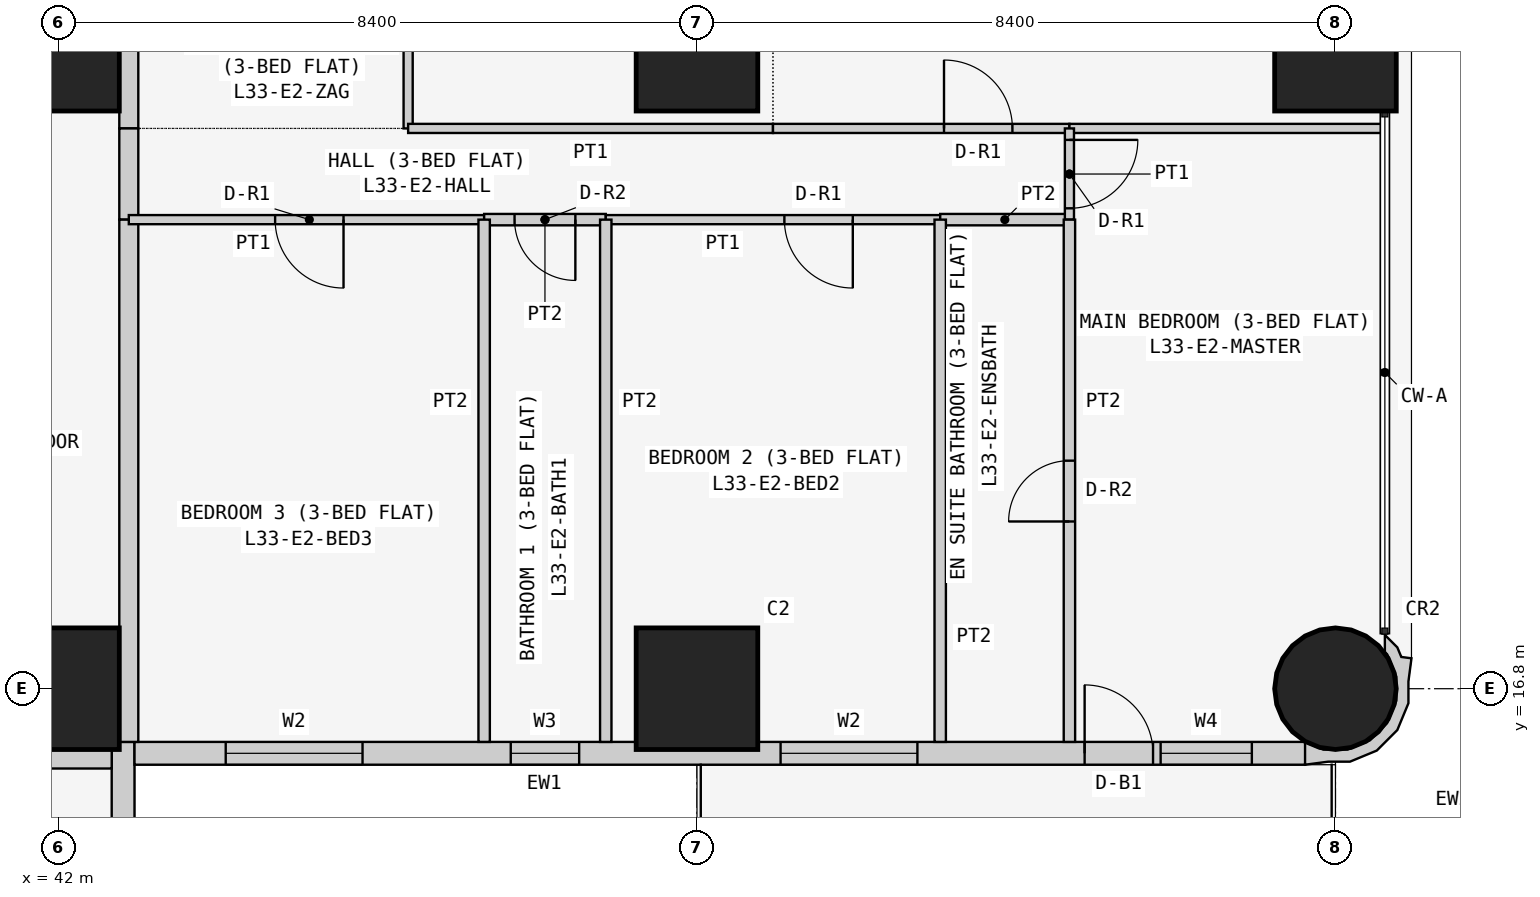
"""IFC4 building model, lengths in metres.
Left out: names, types, materials, properties, quantities, classifications, styles, units other than length and angle.
Written with IfcOpenShell. Run it as: python <this file> out.ifc"""

import sys

from ifc_helpers import new_model, si_unit, direction, frame, frame_2d, origin, origin_2d, place, context, subcontext, project, spatial, polyline, rectangle, circle, outline, extrude, element, fill, save


model = new_model("IFC4")
c1 = context("Model", 3, precision=1e-05, world=origin(), true_north=direction((0.0, 1.0)))
c2 = subcontext(c1, "Body", "Model", "MODEL_VIEW")
j1 = project(units=[si_unit("LENGTHUNIT", "METRE"), si_unit("PLANEANGLEUNIT", "RADIAN")], contexts=[c1])
p1 = place(None, origin())
s1 = spatial("IfcSite", under=j1, at=p1, CompositionType="ELEMENT")
p2 = place(p1, origin())
s2 = spatial("IfcBuilding", under=s1, at=p2, CompositionType="ELEMENT")
p3 = place(p2, frame((0.0, 0.0, 130.5)))
s3 = spatial("IfcBuildingStorey", under=s2, at=p3, CompositionType="ELEMENT", Elevation=130.5)
for number, where, z_axis, x_axis in (
    (1, (42.0, 16.8, 0.0), (0.0, 0.0, 1.0), (1.0, 0.0, 0.0)),
    (2, (42.0, 25.2, 0.0), (0.0, 0.0, 1.0), (1.0, 0.0, 0.0)),
    (3, (50.4, 16.8, 0.0), (0.0, 0.0, 1.0), (1.0, 0.0, 0.0)),
    (4, (50.4, 25.2, 0.0), (0.0, 0.0, 1.0), (1.0, 0.0, 0.0)),
):
    element("IfcColumn", number, at=place(p3, frame(where, z_axis=z_axis, x_axis=x_axis)), inside=s3, PredefinedType="COLUMN", context=c2, shape_type="SweptSolid", body=[
        extrude(rectangle(XDim=1.6, YDim=1.6, at=origin_2d()), origin(), (0.0, 0.0, 1.0), 3.6),
    ])
p4 = place(p3, frame((58.8, 16.8, 0.0), z_axis=(0.0, 0.0, 1.0), x_axis=(1.0, 0.0, 0.0)))
e5 = element("IfcColumn", 5, at=p4, inside=s3, PredefinedType="COLUMN", context=c2, shape_type="SweptSolid", body=[
    extrude(circle(Radius=0.8, at=origin_2d()), origin(), (0.0, 0.0, 1.0), 3.6),
])
p5 = place(p3, frame((58.8, 25.2, 0.0), z_axis=(0.0, 0.0, 1.0), x_axis=(1.0, 0.0, 0.0)))
e6 = element("IfcColumn", 6, at=p5, inside=s3, PredefinedType="COLUMN", context=c2, shape_type="SweptSolid", body=[
    extrude(rectangle(XDim=1.6, YDim=1.6, at=origin_2d()), origin(), (0.0, 0.0, 1.0), 3.6),
])
p6 = place(p3, frame((42.85, 8.8, 0.0), z_axis=(0.0, 0.0, 1.0), x_axis=(0.0, 1.0, 0.0)))
e7 = element("IfcWall", 7, at=p6, inside=s3, PredefinedType="SOLIDWALL", context=c2, shape_type="SweptSolid", body=[
    extrude(rectangle(XDim=7.3, YDim=0.3, at=frame_2d((3.65, 0.0))), origin(), (0.0, 0.0, 1.0), 3.45),
])
p7 = place(p6, frame((3.1, 0.0, 0.9)))
e8 = element("IfcOpeningElement", 8, at=p7, cuts=e7, PredefinedType="OPENING", context=c2, shape_type="SweptSolid", body=[
    extrude(rectangle(XDim=2.4, YDim=1.5, at=frame_2d((1.2, 0.75))), frame((0.0, 0.16, 0.0), z_axis=(0.0, -1.0, 0.0), x_axis=(1.0, 0.0, 0.0)), (0.0, 0.0, 1.0), 0.32),
])
p8 = place(p6, frame((0.75, 0.0, 0.9)))
e9 = element("IfcOpeningElement", 9, at=p8, cuts=e7, PredefinedType="OPENING", context=c2, shape_type="SweptSolid", body=[
    extrude(rectangle(XDim=1.2, YDim=1.5, at=frame_2d((0.6, 0.75))), frame((0.0, 0.16, 0.0), z_axis=(0.0, -1.0, 0.0), x_axis=(1.0, 0.0, 0.0)), (0.0, 0.0, 1.0), 0.32),
])
p9 = place(p3, frame((43.0, 15.95, 0.0), z_axis=(0.0, 0.0, 1.0), x_axis=(1.0, 0.0, 0.0)))
e10 = element("IfcWall", 10, at=p9, inside=s3, PredefinedType="SOLIDWALL", context=c2, shape_type="SweptSolid", body=[
    extrude(rectangle(XDim=15.4, YDim=0.3, at=frame_2d((7.7, 0.0))), origin(), (0.0, 0.0, 1.0), 3.45),
])
p10 = place(p9, frame((1.2, 0.0, 0.9)))
e11 = element("IfcOpeningElement", 11, at=p10, cuts=e10, PredefinedType="OPENING", context=c2, shape_type="SweptSolid", body=[
    extrude(rectangle(XDim=1.8, YDim=1.5, at=frame_2d((0.9, 0.75))), frame((0.0, 0.16, 0.0), z_axis=(0.0, -1.0, 0.0), x_axis=(1.0, 0.0, 0.0)), (0.0, 0.0, 1.0), 0.32),
])
p11 = place(p9, frame((4.95, 0.0, 1.5)))
e12 = element("IfcOpeningElement", 12, at=p11, cuts=e10, PredefinedType="OPENING", context=c2, shape_type="SweptSolid", body=[
    extrude(rectangle(XDim=0.9, YDim=0.7, at=frame_2d((0.45, 0.35))), frame((0.0, 0.16, 0.0), z_axis=(0.0, -1.0, 0.0), x_axis=(1.0, 0.0, 0.0)), (0.0, 0.0, 1.0), 0.32),
])
p12 = place(p9, frame((8.5, 0.0, 0.9)))
e13 = element("IfcOpeningElement", 13, at=p12, cuts=e10, PredefinedType="OPENING", context=c2, shape_type="SweptSolid", body=[
    extrude(rectangle(XDim=1.8, YDim=1.5, at=frame_2d((0.9, 0.75))), frame((0.0, 0.16, 0.0), z_axis=(0.0, -1.0, 0.0), x_axis=(1.0, 0.0, 0.0)), (0.0, 0.0, 1.0), 0.32),
])
p13 = place(p9, frame((12.5, 0.0, 0.0)))
e14 = element("IfcOpeningElement", 14, at=p13, cuts=e10, PredefinedType="OPENING", context=c2, shape_type="SweptSolid", body=[
    extrude(rectangle(XDim=0.9, YDim=2.4, at=frame_2d((0.45, 1.2))), frame((0.0, 0.16, 0.0), z_axis=(0.0, -1.0, 0.0), x_axis=(1.0, 0.0, 0.0)), (0.0, 0.0, 1.0), 0.32),
])
p14 = place(p9, frame((13.5, 0.0, 0.9)))
e15 = element("IfcOpeningElement", 15, at=p14, cuts=e10, PredefinedType="OPENING", context=c2, shape_type="SweptSolid", body=[
    extrude(rectangle(XDim=1.2, YDim=1.5, at=frame_2d((0.6, 0.75))), frame((0.0, 0.16, 0.0), z_axis=(0.0, -1.0, 0.0), x_axis=(1.0, 0.0, 0.0)), (0.0, 0.0, 1.0), 0.32),
])
p15 = place(p3, frame((58.473, 15.983, 0.0), z_axis=(0.0, 0.0, 1.0), x_axis=(0.93923434088, -0.343276641956, 0.0)))
e16 = element("IfcWall", 16, at=p15, inside=s3, PredefinedType="SOLIDWALL", context=c2, shape_type="SweptSolid", body=[
    extrude(outline(polyline([(0.828, 1.599), (0.697, 1.569), (0.604, 1.67), (0.394, 1.767), (0.471, 1.556), (0.508, 1.539), (0.724, 1.304), (0.834, 1.005), (0.82, 0.686), (0.686, 0.397), (0.451, 0.182), (0.152, 0.073), (-0.116, 0.084), (-0.127, 0.078), (-0.146, 0.071), (-0.006, -0.197), (0.266, -0.055), (0.535, 0.044), (0.817, 0.302), (0.978, 0.648), (0.994, 1.03), (0.895, 1.3), (0.828, 1.599)])), origin(), (0.0, 0.0, 1.0), 3.45),
])
p16 = place(p3, frame((42.925, 29.4, 0.0), z_axis=(0.0, 0.0, 1.0), x_axis=(0.0, -1.0, 0.0)))
e17 = element("IfcWall", 17, at=p16, inside=s3, PredefinedType="PARTITIONING", context=c2, shape_type="SweptSolid", body=[
    extrude(rectangle(XDim=5.229, YDim=0.25, at=frame_2d((2.615, 0.0))), origin(), (0.0, 0.0, 1.0), 3.45),
])
p17 = place(p16, frame((2.1, 0.0, 0.0)))
e18 = element("IfcOpeningElement", 18, at=p17, cuts=e17, PredefinedType="OPENING", context=c2, shape_type="SweptSolid", body=[
    extrude(rectangle(XDim=1.0, YDim=2.1, at=frame_2d((0.5, 1.05))), frame((0.0, 0.135, 0.0), z_axis=(0.0, -1.0, 0.0), x_axis=(1.0, 0.0, 0.0)), (0.0, 0.0, 1.0), 0.27),
])
p18 = place(p3, frame((42.925, 24.171, 0.0), z_axis=(0.0, 0.0, 1.0), x_axis=(0.0, -1.0, 0.0)))
e19 = element("IfcWall", 19, at=p18, inside=s3, PredefinedType="PARTITIONING", context=c2, shape_type="SweptSolid", body=[
    extrude(rectangle(XDim=1.2, YDim=0.25, at=frame_2d((0.6, 0.0))), origin(), (0.0, 0.0, 1.0), 3.45),
])
for number, where, z_axis, x_axis in (
    (20, (42.925, 22.971, 0.0), (0.0, 0.0, 1.0), (0.0, -1.0, 0.0)),
    (21, (42.7, 15.875, 0.0), (0.0, 0.0, 1.0), (-1.0, 0.0, 0.0)),
):
    element("IfcWall", number, at=place(p3, frame(where, z_axis=z_axis, x_axis=x_axis)), inside=s3, PredefinedType="PARTITIONING", context=c2, shape_type="SweptSolid", body=[
        extrude(rectangle(XDim=6.871, YDim=0.25, at=frame_2d((3.436, 0.0))), origin(), (0.0, 0.0, 1.0), 3.45),
    ])
p19 = place(p3, frame((46.6, 29.4, 0.0), z_axis=(0.0, 0.0, 1.0), x_axis=(0.0, -1.0, 0.0)))
e22 = element("IfcWall", 22, at=p19, inside=s3, PredefinedType="PARTITIONING", context=c2, shape_type="SweptSolid", body=[
    extrude(rectangle(XDim=5.229, YDim=0.12, at=frame_2d((2.615, 0.0))), origin(), (0.0, 0.0, 1.0), 3.45),
])
p20 = place(p19, frame((1.05, 0.0, 0.0)))
e23 = element("IfcOpeningElement", 23, at=p20, cuts=e22, PredefinedType="OPENING", context=c2, shape_type="SweptSolid", body=[
    extrude(rectangle(XDim=0.9, YDim=2.1, at=frame_2d((0.45, 1.05))), frame((0.0, 0.07, 0.0), z_axis=(0.0, -1.0, 0.0), x_axis=(1.0, 0.0, 0.0)), (0.0, 0.0, 1.0), 0.14),
])
p21 = place(p3, frame((51.4, 24.171, 0.0), z_axis=(0.0, 0.0, 1.0), x_axis=(-1.0, 0.0, 0.0)))
e24 = element("IfcWall", 24, at=p21, inside=s3, PredefinedType="PARTITIONING", context=c2, shape_type="SweptSolid", body=[
    extrude(rectangle(XDim=4.8, YDim=0.12, at=frame_2d((2.4, 0.0))), origin(), (0.0, 0.0, 1.0), 3.45),
])
p22 = place(p3, frame((55.3, 24.171, 0.0), z_axis=(0.0, 0.0, 1.0), x_axis=(-1.0, 0.0, 0.0)))
e25 = element("IfcWall", 25, at=p22, inside=s3, PredefinedType="PARTITIONING", context=c2, shape_type="SweptSolid", body=[
    extrude(rectangle(XDim=3.9, YDim=0.12, at=frame_2d((1.95, 0.0))), origin(), (0.0, 0.0, 1.0), 3.45),
])
p23 = place(p22, frame((0.75, 0.0, 0.0)))
e26 = element("IfcOpeningElement", 26, at=p23, cuts=e25, PredefinedType="OPENING", context=c2, shape_type="SweptSolid", body=[
    extrude(rectangle(XDim=0.9, YDim=2.1, at=frame_2d((0.45, 1.05))), frame((0.0, 0.07, 0.0), z_axis=(0.0, -1.0, 0.0), x_axis=(1.0, 0.0, 0.0)), (0.0, 0.0, 1.0), 0.14),
])
p24 = place(p3, frame((59.45, 24.171, 0.0), z_axis=(0.0, 0.0, 1.0), x_axis=(-1.0, 0.0, 0.0)))
e27 = element("IfcWall", 27, at=p24, inside=s3, PredefinedType="PARTITIONING", context=c2, shape_type="SweptSolid", body=[
    extrude(rectangle(XDim=4.15, YDim=0.12, at=frame_2d((2.075, 0.0))), origin(), (0.0, 0.0, 1.0), 3.45),
])
p25 = place(p3, frame((47.6, 22.971, 0.0), z_axis=(0.0, 0.0, 1.0), x_axis=(-1.0, 0.0, 0.0)))
e28 = element("IfcWall", 28, at=p25, inside=s3, PredefinedType="PARTITIONING", context=c2, shape_type="SweptSolid", body=[
    extrude(rectangle(XDim=4.675, YDim=0.12, at=frame_2d((2.337, 0.0))), origin(), (0.0, 0.0, 1.0), 3.45),
])
p26 = place(p25, frame((1.85, 0.0, 0.0)))
e29 = element("IfcOpeningElement", 29, at=p26, cuts=e28, PredefinedType="OPENING", context=c2, shape_type="SweptSolid", body=[
    extrude(rectangle(XDim=0.9, YDim=2.1, at=frame_2d((0.45, 1.05))), frame((0.0, 0.07, 0.0), z_axis=(0.0, -1.0, 0.0), x_axis=(1.0, 0.0, 0.0)), (0.0, 0.0, 1.0), 0.14),
])
p27 = place(p3, frame((49.2, 22.971, 0.0), z_axis=(0.0, 0.0, 1.0), x_axis=(-1.0, 0.0, 0.0)))
e30 = element("IfcWall", 30, at=p27, inside=s3, PredefinedType="PARTITIONING", context=c2, shape_type="SweptSolid", body=[
    extrude(rectangle(XDim=1.6, YDim=0.15, at=frame_2d((0.8, 0.0))), origin(), (0.0, 0.0, 1.0), 3.45),
])
p28 = place(p27, frame((0.4, 0.0, 0.0)))
e31 = element("IfcOpeningElement", 31, at=p28, cuts=e30, PredefinedType="OPENING", context=c2, shape_type="SweptSolid", body=[
    extrude(rectangle(XDim=0.8, YDim=2.1, at=frame_2d((0.4, 1.05))), frame((0.0, 0.085, 0.0), z_axis=(0.0, -1.0, 0.0), x_axis=(1.0, 0.0, 0.0)), (0.0, 0.0, 1.0), 0.17),
])
p29 = place(p3, frame((53.6, 22.971, 0.0), z_axis=(0.0, 0.0, 1.0), x_axis=(-1.0, 0.0, 0.0)))
e32 = element("IfcWall", 32, at=p29, inside=s3, PredefinedType="PARTITIONING", context=c2, shape_type="SweptSolid", body=[
    extrude(rectangle(XDim=4.4, YDim=0.12, at=frame_2d((2.2, 0.0))), origin(), (0.0, 0.0, 1.0), 3.45),
])
p30 = place(p29, frame((1.15, 0.0, 0.0)))
e33 = element("IfcOpeningElement", 33, at=p30, cuts=e32, PredefinedType="OPENING", context=c2, shape_type="SweptSolid", body=[
    extrude(rectangle(XDim=0.9, YDim=2.1, at=frame_2d((0.45, 1.05))), frame((0.0, 0.07, 0.0), z_axis=(0.0, -1.0, 0.0), x_axis=(1.0, 0.0, 0.0)), (0.0, 0.0, 1.0), 0.14),
])
p31 = place(p3, frame((55.3, 22.971, 0.0), z_axis=(0.0, 0.0, 1.0), x_axis=(-1.0, 0.0, 0.0)))
e34 = element("IfcWall", 34, at=p31, inside=s3, PredefinedType="PARTITIONING", context=c2, shape_type="SweptSolid", body=[
    extrude(rectangle(XDim=1.7, YDim=0.15, at=frame_2d((0.85, 0.0))), origin(), (0.0, 0.0, 1.0), 3.45),
])
p32 = place(p3, frame((55.3, 24.171, 0.0), z_axis=(0.0, 0.0, 1.0), x_axis=(0.0, -1.0, 0.0)))
e35 = element("IfcWall", 35, at=p32, inside=s3, PredefinedType="PARTITIONING", context=c2, shape_type="SweptSolid", body=[
    extrude(rectangle(XDim=1.2, YDim=0.12, at=frame_2d((0.6, 0.0))), origin(), (0.0, 0.0, 1.0), 3.45),
])
p33 = place(p32, frame((0.151, 0.0, 0.0)))
e36 = element("IfcOpeningElement", 36, at=p33, cuts=e35, PredefinedType="OPENING", context=c2, shape_type="SweptSolid", body=[
    extrude(rectangle(XDim=0.9, YDim=2.1, at=frame_2d((0.45, 1.05))), frame((0.0, 0.07, 0.0), z_axis=(0.0, -1.0, 0.0), x_axis=(1.0, 0.0, 0.0)), (0.0, 0.0, 1.0), 0.14),
])
for number, where, z_axis, x_axis in (
    (37, (47.6, 22.971, 0.0), (0.0, 0.0, 1.0), (0.0, -1.0, 0.0)),
    (38, (49.2, 22.971, 0.0), (0.0, 0.0, 1.0), (0.0, -1.0, 0.0)),
    (39, (53.6, 22.971, 0.0), (0.0, 0.0, 1.0), (0.0, -1.0, 0.0)),
):
    element("IfcWall", number, at=place(p3, frame(where, z_axis=z_axis, x_axis=x_axis)), inside=s3, PredefinedType="PARTITIONING", context=c2, shape_type="SweptSolid", body=[
        extrude(rectangle(XDim=6.871, YDim=0.15, at=frame_2d((3.436, 0.0))), origin(), (0.0, 0.0, 1.0), 3.45),
    ])
p34 = place(p3, frame((55.3, 22.971, 0.0), z_axis=(0.0, 0.0, 1.0), x_axis=(0.0, -1.0, 0.0)))
e40 = element("IfcWall", 40, at=p34, inside=s3, PredefinedType="PARTITIONING", context=c2, shape_type="SweptSolid", body=[
    extrude(rectangle(XDim=6.871, YDim=0.15, at=frame_2d((3.436, 0.0))), origin(), (0.0, 0.0, 1.0), 3.45),
])
p35 = place(p34, frame((3.171, 0.0, 0.0)))
e41 = element("IfcOpeningElement", 41, at=p35, cuts=e40, PredefinedType="OPENING", context=c2, shape_type="SweptSolid", body=[
    extrude(rectangle(XDim=0.8, YDim=2.1, at=frame_2d((0.4, 1.05))), frame((0.0, 0.085, 0.0), z_axis=(0.0, -1.0, 0.0), x_axis=(1.0, 0.0, 0.0)), (0.0, 0.0, 1.0), 0.17),
])
p36 = place(p10, origin())
e42 = element("IfcWindow", 42, at=p36, inside=s3, PartitioningType="SINGLE_PANEL", PredefinedType="WINDOW", context=c2, shape_type="SweptSolid", body=[
    extrude(rectangle(XDim=1.8, YDim=1.5, at=frame_2d((0.9, 0.75))), frame((0.0, 0.03, 0.0), z_axis=(0.0, -1.0, 0.0), x_axis=(1.0, 0.0, 0.0)), (0.0, 0.0, 1.0), 0.06),
])
fill(e11, e42)
p37 = place(p11, origin())
e43 = element("IfcWindow", 43, at=p37, inside=s3, PartitioningType="SINGLE_PANEL", PredefinedType="WINDOW", context=c2, shape_type="SweptSolid", body=[
    extrude(rectangle(XDim=0.9, YDim=0.7, at=frame_2d((0.45, 0.35))), frame((0.0, 0.03, 0.0), z_axis=(0.0, -1.0, 0.0), x_axis=(1.0, 0.0, 0.0)), (0.0, 0.0, 1.0), 0.06),
])
fill(e12, e43)
p38 = place(p12, origin())
e44 = element("IfcWindow", 44, at=p38, inside=s3, PartitioningType="SINGLE_PANEL", PredefinedType="WINDOW", context=c2, shape_type="SweptSolid", body=[
    extrude(rectangle(XDim=1.8, YDim=1.5, at=frame_2d((0.9, 0.75))), frame((0.0, 0.03, 0.0), z_axis=(0.0, -1.0, 0.0), x_axis=(1.0, 0.0, 0.0)), (0.0, 0.0, 1.0), 0.06),
])
fill(e13, e44)
p39 = place(p13, origin())
e45 = element("IfcDoor", 45, at=p39, inside=s3, OperationType="SINGLE_SWING_LEFT", PredefinedType="DOOR", context=c2, shape_type="SweptSolid", body=[
    extrude(rectangle(XDim=0.9, YDim=2.4, at=frame_2d((0.45, 1.2))), frame((0.0, 0.025, 0.0), z_axis=(0.0, -1.0, 0.0), x_axis=(1.0, 0.0, 0.0)), (0.0, 0.0, 1.0), 0.05),
])
fill(e14, e45)
p40 = place(p14, origin())
e46 = element("IfcWindow", 46, at=p40, inside=s3, PartitioningType="SINGLE_PANEL", PredefinedType="WINDOW", context=c2, shape_type="SweptSolid", body=[
    extrude(rectangle(XDim=1.2, YDim=1.5, at=frame_2d((0.6, 0.75))), frame((0.0, 0.03, 0.0), z_axis=(0.0, -1.0, 0.0), x_axis=(1.0, 0.0, 0.0)), (0.0, 0.0, 1.0), 0.06),
])
fill(e15, e46)
p41 = place(p23, frame((0.9, 0.0, 0.0), z_axis=(0.0, 0.0, 1.0), x_axis=(-1.0, 0.0, 0.0)))
e47 = element("IfcDoor", 47, at=p41, inside=s3, OperationType="SINGLE_SWING_LEFT", PredefinedType="DOOR", context=c2, shape_type="SweptSolid", body=[
    extrude(rectangle(XDim=0.9, YDim=2.1, at=frame_2d((0.45, 1.05))), frame((0.0, 0.025, 0.0), z_axis=(0.0, -1.0, 0.0), x_axis=(1.0, 0.0, 0.0)), (0.0, 0.0, 1.0), 0.05),
])
fill(e26, e47)
p42 = place(p26, origin())
e48 = element("IfcDoor", 48, at=p42, inside=s3, OperationType="SINGLE_SWING_LEFT", PredefinedType="DOOR", context=c2, shape_type="SweptSolid", body=[
    extrude(rectangle(XDim=0.9, YDim=2.1, at=frame_2d((0.45, 1.05))), frame((0.0, 0.025, 0.0), z_axis=(0.0, -1.0, 0.0), x_axis=(1.0, 0.0, 0.0)), (0.0, 0.0, 1.0), 0.05),
])
fill(e29, e48)
p43 = place(p28, origin())
e49 = element("IfcDoor", 49, at=p43, inside=s3, OperationType="SINGLE_SWING_LEFT", PredefinedType="DOOR", context=c2, shape_type="SweptSolid", body=[
    extrude(rectangle(XDim=0.8, YDim=2.1, at=frame_2d((0.4, 1.05))), frame((0.0, 0.025, 0.0), z_axis=(0.0, -1.0, 0.0), x_axis=(1.0, 0.0, 0.0)), (0.0, 0.0, 1.0), 0.05),
])
fill(e31, e49)
p44 = place(p30, origin())
e50 = element("IfcDoor", 50, at=p44, inside=s3, OperationType="SINGLE_SWING_LEFT", PredefinedType="DOOR", context=c2, shape_type="SweptSolid", body=[
    extrude(rectangle(XDim=0.9, YDim=2.1, at=frame_2d((0.45, 1.05))), frame((0.0, 0.025, 0.0), z_axis=(0.0, -1.0, 0.0), x_axis=(1.0, 0.0, 0.0)), (0.0, 0.0, 1.0), 0.05),
])
fill(e33, e50)
p45 = place(p33, origin())
e51 = element("IfcDoor", 51, at=p45, inside=s3, OperationType="SINGLE_SWING_LEFT", PredefinedType="DOOR", context=c2, shape_type="SweptSolid", body=[
    extrude(rectangle(XDim=0.9, YDim=2.1, at=frame_2d((0.45, 1.05))), frame((0.0, 0.025, 0.0), z_axis=(0.0, -1.0, 0.0), x_axis=(1.0, 0.0, 0.0)), (0.0, 0.0, 1.0), 0.05),
])
fill(e36, e51)
p46 = place(p35, frame((0.8, 0.0, 0.0), z_axis=(0.0, 0.0, 1.0), x_axis=(-1.0, 0.0, 0.0)))
e52 = element("IfcDoor", 52, at=p46, inside=s3, OperationType="SINGLE_SWING_LEFT", PredefinedType="DOOR", context=c2, shape_type="SweptSolid", body=[
    extrude(rectangle(XDim=0.8, YDim=2.1, at=frame_2d((0.4, 1.05))), frame((0.0, 0.025, 0.0), z_axis=(0.0, -1.0, 0.0), x_axis=(1.0, 0.0, 0.0)), (0.0, 0.0, 1.0), 0.05),
])
fill(e41, e52)
save(model, sys.argv[1])
